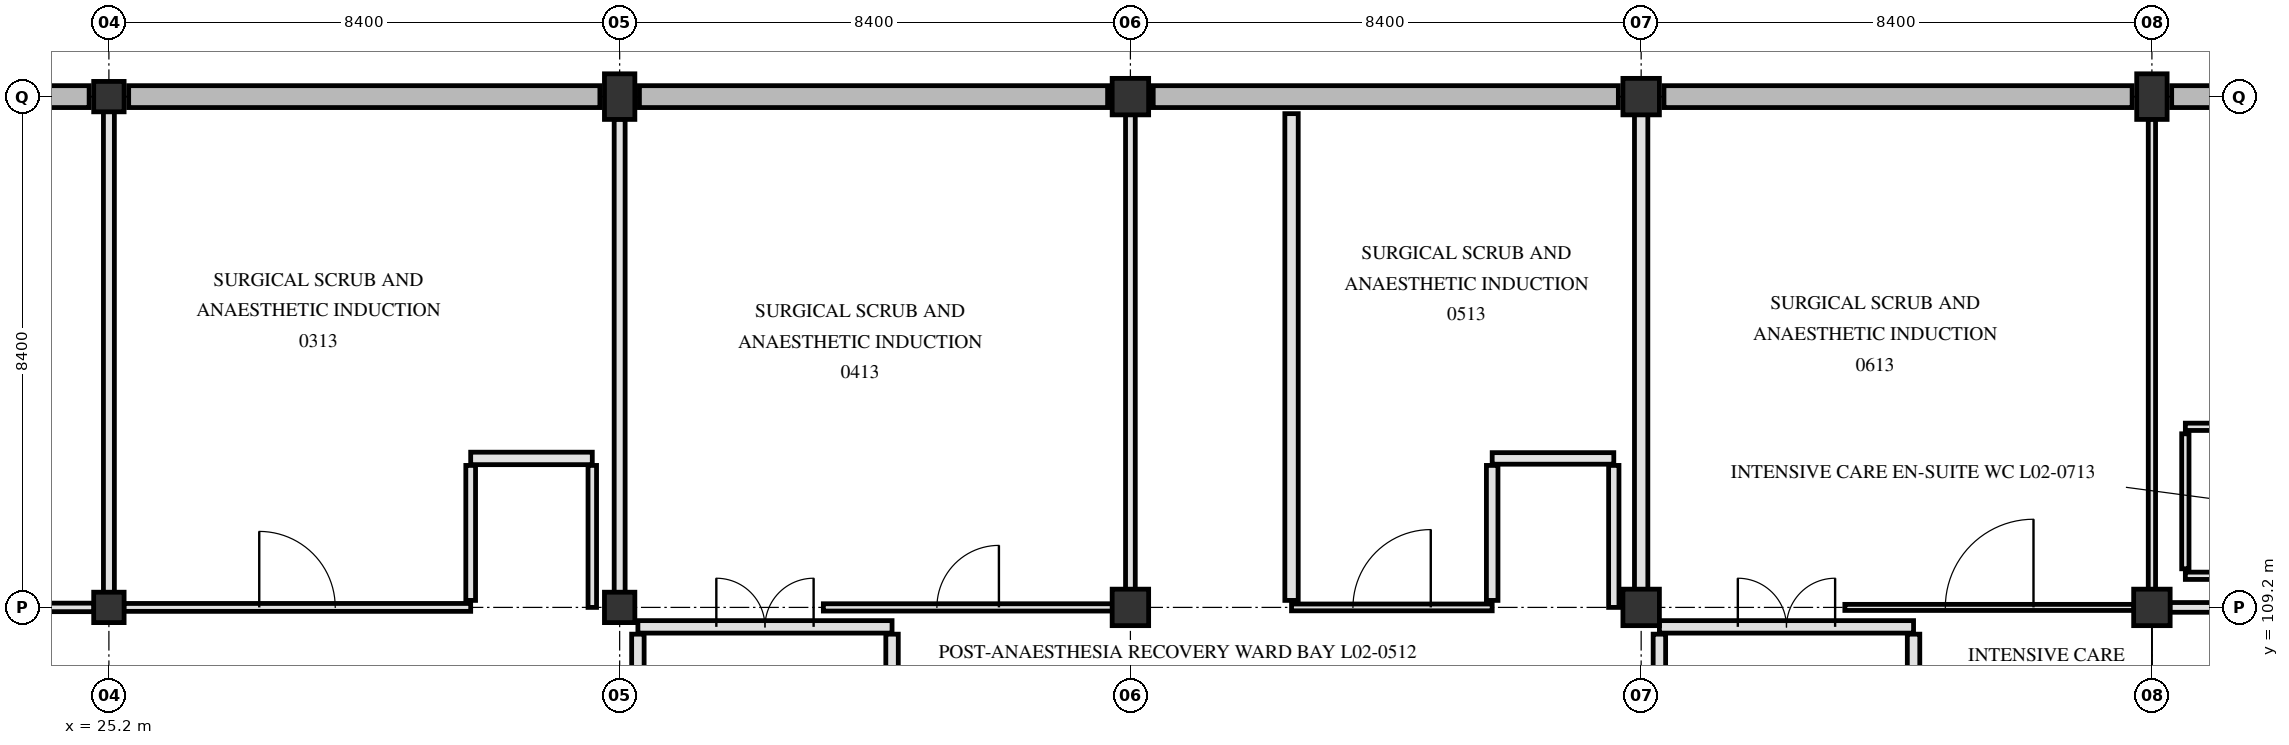
"""IFC4 building model, lengths in metres.
Left out: names, types, materials, properties, quantities, classifications, styles, units other than length and angle.
Written with IfcOpenShell. Run it as: python <this file> out.ifc"""

import sys

from ifc_helpers import new_model, si_unit, direction, frame, frame_2d, origin, origin_2d, place, context, subcontext, project, spatial, rectangle, extrude, element, fill, save


model = new_model("IFC4")
c1 = context("Model", 3, precision=1e-05, world=origin(), true_north=direction((0.0, 1.0)))
c2 = subcontext(c1, "Body", "Model", "MODEL_VIEW")
j1 = project(units=[si_unit("LENGTHUNIT", "METRE"), si_unit("PLANEANGLEUNIT", "RADIAN")], contexts=[c1])
p1 = place(None, origin())
s1 = spatial("IfcSite", under=j1, at=p1, CompositionType="ELEMENT")
p2 = place(p1, origin())
s2 = spatial("IfcBuilding", under=s1, at=p2, CompositionType="ELEMENT")
p3 = place(p2, frame((0.0, 0.0, 9.3)))
s3 = spatial("IfcBuildingStorey", under=s2, at=p3, CompositionType="ELEMENT", Elevation=9.3)
for number, where, z_axis, x_axis in (
    (1, (25.2, 109.2, 0.0), (0.0, 0.0, 1.0), (1.0, 0.0, 0.0)),
    (2, (25.2, 117.6, 0.0), (0.0, 0.0, 1.0), (1.0, 0.0, 0.0)),
    (3, (33.6, 109.2, 0.0), (0.0, 0.0, 1.0), (1.0, 0.0, 0.0)),
):
    element("IfcColumn", number, at=place(p3, frame(where, z_axis=z_axis, x_axis=x_axis)), inside=s3, PredefinedType="COLUMN", context=c2, shape_type="SweptSolid", body=[
        extrude(rectangle(XDim=0.5, YDim=0.5, at=origin_2d()), origin(), (0.0, 0.0, 1.0), 5.1),
    ])
p4 = place(p3, frame((33.6, 117.6, 0.0), z_axis=(0.0, 0.0, 1.0), x_axis=(1.0, 0.0, 0.0)))
e4 = element("IfcColumn", 4, at=p4, inside=s3, PredefinedType="PILASTER", context=c2, shape_type="SweptSolid", body=[
    extrude(rectangle(XDim=0.5, YDim=0.75, at=origin_2d()), origin(), (0.0, 0.0, 1.0), 5.1),
])
for number, where, z_axis, x_axis in (
    (5, (42.0, 109.2, 0.0), (0.0, 0.0, 1.0), (1.0, 0.0, 0.0)),
    (6, (42.0, 117.6, 0.0), (0.0, 0.0, 1.0), (1.0, 0.0, 0.0)),
    (7, (50.4, 109.2, 0.0), (0.0, 0.0, 1.0), (1.0, 0.0, 0.0)),
    (8, (50.4, 117.6, 0.0), (0.0, 0.0, 1.0), (1.0, 0.0, 0.0)),
    (9, (58.8, 109.2, 0.0), (0.0, 0.0, 1.0), (1.0, 0.0, 0.0)),
):
    element("IfcColumn", number, at=place(p3, frame(where, z_axis=z_axis, x_axis=x_axis)), inside=s3, PredefinedType="COLUMN", context=c2, shape_type="SweptSolid", body=[
        extrude(rectangle(XDim=0.6, YDim=0.6, at=origin_2d()), origin(), (0.0, 0.0, 1.0), 5.1),
    ])
p5 = place(p3, frame((58.8, 117.6, 0.0), z_axis=(0.0, 0.0, 1.0), x_axis=(1.0, 0.0, 0.0)))
e10 = element("IfcColumn", 10, at=p5, inside=s3, PredefinedType="PILASTER", context=c2, shape_type="SweptSolid", body=[
    extrude(rectangle(XDim=0.5, YDim=0.75, at=origin_2d()), origin(), (0.0, 0.0, 1.0), 5.1),
])
for number, where, z_axis, x_axis in (
    (11, (17.125, 117.6, 0.0), (0.0, 0.0, 1.0), (1.0, 0.0, 0.0)),
    (12, (25.525, 117.6, 0.0), (0.0, 0.0, 1.0), (1.0, 0.0, 0.0)),
):
    element("IfcWall", number, at=place(p3, frame(where, z_axis=z_axis, x_axis=x_axis)), inside=s3, PredefinedType="SOLIDWALL", context=c2, shape_type="SweptSolid", body=[
        extrude(rectangle(XDim=7.75, YDim=0.36, at=frame_2d((3.875, 0.0))), origin(), (0.0, 0.0, 1.0), 4.78),
    ])
p6 = place(p3, frame((33.925, 117.6, 0.0), z_axis=(0.0, 0.0, 1.0), x_axis=(1.0, 0.0, 0.0)))
e13 = element("IfcWall", 13, at=p6, inside=s3, PredefinedType="SOLIDWALL", context=c2, shape_type="SweptSolid", body=[
    extrude(rectangle(XDim=7.7, YDim=0.36, at=frame_2d((3.85, 0.0))), origin(), (0.0, 0.0, 1.0), 4.78),
])
p7 = place(p3, frame((42.375, 117.6, 0.0), z_axis=(0.0, 0.0, 1.0), x_axis=(1.0, 0.0, 0.0)))
e14 = element("IfcWall", 14, at=p7, inside=s3, PredefinedType="SOLIDWALL", context=c2, shape_type="SweptSolid", body=[
    extrude(rectangle(XDim=7.65, YDim=0.36, at=frame_2d((3.825, 0.0))), origin(), (0.0, 0.0, 1.0), 4.78),
])
p8 = place(p3, frame((50.775, 117.6, 0.0), z_axis=(0.0, 0.0, 1.0), x_axis=(1.0, 0.0, 0.0)))
e15 = element("IfcWall", 15, at=p8, inside=s3, PredefinedType="SOLIDWALL", context=c2, shape_type="SweptSolid", body=[
    extrude(rectangle(XDim=7.7, YDim=0.36, at=frame_2d((3.85, 0.0))), origin(), (0.0, 0.0, 1.0), 4.78),
])
p9 = place(p3, frame((59.125, 117.6, 0.0), z_axis=(0.0, 0.0, 1.0), x_axis=(1.0, 0.0, 0.0)))
e16 = element("IfcWall", 16, at=p9, inside=s3, PredefinedType="SOLIDWALL", context=c2, shape_type="SweptSolid", body=[
    extrude(rectangle(XDim=7.65, YDim=0.36, at=frame_2d((3.825, 0.0))), origin(), (0.0, 0.0, 1.0), 4.78),
])
p10 = place(p3, frame((38.08, 104.64, 0.0), z_axis=(0.0, 0.0, 1.0), x_axis=(0.0, 1.0, 0.0)))
e17 = element("IfcWall", 17, at=p10, inside=s3, PredefinedType="PARTITIONING", context=c2, shape_type="SweptSolid", body=[
    extrude(rectangle(XDim=4.12, YDim=0.205, at=frame_2d((2.06, 0.0))), origin(), (0.0, 0.0, 1.0), 4.77),
])
p11 = place(p3, frame((33.9, 104.64, 0.0), z_axis=(0.0, 0.0, 1.0), x_axis=(0.0, 1.0, 0.0)))
e18 = element("IfcWall", 18, at=p11, inside=s3, PredefinedType="PARTITIONING", context=c2, shape_type="SweptSolid", body=[
    extrude(rectangle(XDim=4.12, YDim=0.205, at=frame_2d((2.06, 0.0))), origin(), (0.0, 0.0, 1.0), 4.17),
])
p12 = place(p3, frame((33.9, 108.88, 0.0), z_axis=(0.0, 0.0, 1.0), x_axis=(1.0, 0.0, 0.0)))
e19 = element("IfcWall", 19, at=p12, inside=s3, PredefinedType="PARTITIONING", context=c2, shape_type="SweptSolid", body=[
    extrude(rectangle(XDim=4.18, YDim=0.205, at=frame_2d((2.09, 0.0))), origin(), (0.0, 0.0, 1.0), 4.02),
])
p13 = place(p12, frame((1.29, 0.0, 0.0)))
e20 = element("IfcOpeningElement", 20, at=p13, cuts=e19, PredefinedType="OPENING", context=c2, shape_type="SweptSolid", body=[
    extrude(rectangle(XDim=1.6, YDim=2.25, at=frame_2d((0.8, 1.125))), frame((0.0, 0.113, 0.0), z_axis=(0.0, -1.0, 0.0), x_axis=(1.0, 0.0, 0.0)), (0.0, 0.0, 1.0), 0.225),
])
p14 = place(p3, frame((54.88, 104.64, 0.0), z_axis=(0.0, 0.0, 1.0), x_axis=(0.0, 1.0, 0.0)))
e21 = element("IfcWall", 21, at=p14, inside=s3, PredefinedType="PARTITIONING", context=c2, shape_type="SweptSolid", body=[
    extrude(rectangle(XDim=4.12, YDim=0.205, at=frame_2d((2.06, 0.0))), origin(), (0.0, 0.0, 1.0), 4.77),
])
p15 = place(p3, frame((50.7, 104.64, 0.0), z_axis=(0.0, 0.0, 1.0), x_axis=(0.0, 1.0, 0.0)))
e22 = element("IfcWall", 22, at=p15, inside=s3, PredefinedType="PARTITIONING", context=c2, shape_type="SweptSolid", body=[
    extrude(rectangle(XDim=4.12, YDim=0.205, at=frame_2d((2.06, 0.0))), origin(), (0.0, 0.0, 1.0), 4.17),
])
p16 = place(p3, frame((50.7, 108.88, 0.0), z_axis=(0.0, 0.0, 1.0), x_axis=(1.0, 0.0, 0.0)))
e23 = element("IfcWall", 23, at=p16, inside=s3, PredefinedType="PARTITIONING", context=c2, shape_type="SweptSolid", body=[
    extrude(rectangle(XDim=4.18, YDim=0.205, at=frame_2d((2.09, 0.0))), origin(), (0.0, 0.0, 1.0), 4.02),
])
p17 = place(p16, frame((1.29, 0.0, 0.0)))
e24 = element("IfcOpeningElement", 24, at=p17, cuts=e23, PredefinedType="OPENING", context=c2, shape_type="SweptSolid", body=[
    extrude(rectangle(XDim=1.6, YDim=2.25, at=frame_2d((0.8, 1.125))), frame((0.0, 0.113, 0.0), z_axis=(0.0, -1.0, 0.0), x_axis=(1.0, 0.0, 0.0)), (0.0, 0.0, 1.0), 0.225),
])
p18 = place(p3, frame((17.045, 109.2, 0.0), z_axis=(0.0, 0.0, 1.0), x_axis=(1.0, 0.0, 0.0)))
e25 = element("IfcWall", 25, at=p18, inside=s3, PredefinedType="PARTITIONING", context=c2, shape_type="SweptSolid", body=[
    extrude(rectangle(XDim=7.91, YDim=0.14, at=frame_2d((3.955, 0.0))), origin(), (0.0, 0.0, 1.0), 4.02),
])
p19 = place(p18, frame((3.005, 0.0, 0.0)))
e26 = element("IfcOpeningElement", 26, at=p19, cuts=e25, PredefinedType="OPENING", context=c2, shape_type="SweptSolid", body=[
    extrude(rectangle(XDim=1.9, YDim=2.3, at=frame_2d((0.95, 1.15))), frame((0.0, 0.08, 0.0), z_axis=(0.0, -1.0, 0.0), x_axis=(1.0, 0.0, 0.0)), (0.0, 0.0, 1.0), 0.16),
])
p20 = place(p3, frame((25.445, 109.2, 0.0), z_axis=(0.0, 0.0, 1.0), x_axis=(1.0, 0.0, 0.0)))
e27 = element("IfcWall", 27, at=p20, inside=s3, PredefinedType="PARTITIONING", context=c2, shape_type="SweptSolid", body=[
    extrude(rectangle(XDim=5.705, YDim=0.13, at=frame_2d((2.853, 0.0))), origin(), (0.0, 0.0, 1.0), 4.02),
])
p21 = place(p20, frame((2.228, 0.0, 0.0)))
e28 = element("IfcOpeningElement", 28, at=p21, cuts=e27, PredefinedType="OPENING", context=c2, shape_type="SweptSolid", body=[
    extrude(rectangle(XDim=1.25, YDim=2.2, at=frame_2d((0.625, 1.1))), frame((0.0, 0.075, 0.0), z_axis=(0.0, -1.0, 0.0), x_axis=(1.0, 0.0, 0.0)), (0.0, 0.0, 1.0), 0.15),
])
p22 = place(p3, frame((36.95, 109.2, 0.0), z_axis=(0.0, 0.0, 1.0), x_axis=(1.0, 0.0, 0.0)))
e29 = element("IfcWall", 29, at=p22, inside=s3, PredefinedType="PARTITIONING", context=c2, shape_type="SweptSolid", body=[
    extrude(rectangle(XDim=4.755, YDim=0.12, at=frame_2d((2.377, 0.0))), origin(), (0.0, 0.0, 1.0), 4.02),
])
p23 = place(p22, frame((1.867, 0.0, 0.0)))
e30 = element("IfcOpeningElement", 30, at=p23, cuts=e29, PredefinedType="OPENING", context=c2, shape_type="SweptSolid", body=[
    extrude(rectangle(XDim=1.02, YDim=2.12, at=frame_2d((0.51, 1.06))), frame((0.0, 0.07, 0.0), z_axis=(0.0, -1.0, 0.0), x_axis=(1.0, 0.0, 0.0)), (0.0, 0.0, 1.0), 0.14),
])
p24 = place(p3, frame((44.65, 109.2, 0.0), z_axis=(0.0, 0.0, 1.0), x_axis=(1.0, 0.0, 0.0)))
e31 = element("IfcWall", 31, at=p24, inside=s3, PredefinedType="PARTITIONING", context=c2, shape_type="SweptSolid", body=[
    extrude(rectangle(XDim=3.3, YDim=0.112, at=frame_2d((1.65, 0.0))), origin(), (0.0, 0.0, 1.0), 4.02),
])
p25 = place(p24, frame((1.01, 0.0, 0.0)))
e32 = element("IfcOpeningElement", 32, at=p25, cuts=e31, PredefinedType="OPENING", context=c2, shape_type="SweptSolid", body=[
    extrude(rectangle(XDim=1.28, YDim=2.18, at=frame_2d((0.64, 1.09))), frame((0.0, 0.066, 0.0), z_axis=(0.0, -1.0, 0.0), x_axis=(1.0, 0.0, 0.0)), (0.0, 0.0, 1.0), 0.132),
])
p26 = place(p3, frame((53.75, 109.2, 0.0), z_axis=(0.0, 0.0, 1.0), x_axis=(1.0, 0.0, 0.0)))
e33 = element("IfcWall", 33, at=p26, inside=s3, PredefinedType="PARTITIONING", context=c2, shape_type="SweptSolid", body=[
    extrude(rectangle(XDim=4.755, YDim=0.1, at=frame_2d((2.377, 0.0))), origin(), (0.0, 0.0, 1.0), 4.02),
])
p27 = place(p26, frame((1.653, 0.0, 0.0)))
e34 = element("IfcOpeningElement", 34, at=p27, cuts=e33, PredefinedType="OPENING", context=c2, shape_type="SweptSolid", body=[
    extrude(rectangle(XDim=1.45, YDim=2.2, at=frame_2d((0.725, 1.1))), frame((0.0, 0.06, 0.0), z_axis=(0.0, -1.0, 0.0), x_axis=(1.0, 0.0, 0.0)), (0.0, 0.0, 1.0), 0.12),
])
p28 = place(p3, frame((59.095, 109.2, 0.0), z_axis=(0.0, 0.0, 1.0), x_axis=(1.0, 0.0, 0.0)))
e35 = element("IfcWall", 35, at=p28, inside=s3, PredefinedType="PARTITIONING", context=c2, shape_type="SweptSolid", body=[
    extrude(rectangle(XDim=7.76, YDim=0.16, at=frame_2d((3.88, 0.0))), origin(), (0.0, 0.0, 1.0), 4.17),
])
p29 = place(p28, frame((3.305, 0.0, 0.0)))
e36 = element("IfcOpeningElement", 36, at=p29, cuts=e35, PredefinedType="OPENING", context=c2, shape_type="SweptSolid", body=[
    extrude(rectangle(XDim=1.15, YDim=2.15, at=frame_2d((0.575, 1.075))), frame((0.0, 0.09, 0.0), z_axis=(0.0, -1.0, 0.0), x_axis=(1.0, 0.0, 0.0)), (0.0, 0.0, 1.0), 0.18),
])
p30 = place(p3, frame((59.35, 109.72, 0.0), z_axis=(0.0, 0.0, 1.0), x_axis=(1.0, 0.0, 0.0)))
e37 = element("IfcWall", 37, at=p30, inside=s3, PredefinedType="PARTITIONING", context=c2, shape_type="SweptSolid", body=[
    extrude(rectangle(XDim=2.9, YDim=0.12, at=frame_2d((1.45, 0.0))), origin(), (0.0, 0.0, 1.0), 4.77),
])
p31 = place(p3, frame((31.15, 111.65, 0.0), z_axis=(0.0, 0.0, 1.0), x_axis=(1.0, 0.0, 0.0)))
e38 = element("IfcWall", 38, at=p31, inside=s3, PredefinedType="PARTITIONING", context=c2, shape_type="SweptSolid", body=[
    extrude(rectangle(XDim=2.0, YDim=0.205, at=frame_2d((1.0, 0.0))), origin(), (0.0, 0.0, 1.0), 4.77),
])
p32 = place(p3, frame((47.95, 111.65, 0.0), z_axis=(0.0, 0.0, 1.0), x_axis=(1.0, 0.0, 0.0)))
e39 = element("IfcWall", 39, at=p32, inside=s3, PredefinedType="PARTITIONING", context=c2, shape_type="SweptSolid", body=[
    extrude(rectangle(XDim=2.0, YDim=0.19, at=frame_2d((1.0, 0.0))), origin(), (0.0, 0.0, 1.0), 4.77),
])
p33 = place(p3, frame((59.35, 112.17, 0.0), z_axis=(0.0, 0.0, 1.0), x_axis=(1.0, 0.0, 0.0)))
e40 = element("IfcWall", 40, at=p33, inside=s3, PredefinedType="PARTITIONING", context=c2, shape_type="SweptSolid", body=[
    extrude(rectangle(XDim=2.9, YDim=0.12, at=frame_2d((1.45, 0.0))), origin(), (0.0, 0.0, 1.0), 4.77),
])
p34 = place(p33, frame((0.975, 0.0, 0.0)))
e41 = element("IfcOpeningElement", 41, at=p34, cuts=e40, PredefinedType="OPENING", context=c2, shape_type="SweptSolid", body=[
    extrude(rectangle(XDim=0.95, YDim=2.1, at=frame_2d((0.475, 1.05))), frame((0.0, 0.07, 0.0), z_axis=(0.0, -1.0, 0.0), x_axis=(1.0, 0.0, 0.0)), (0.0, 0.0, 1.0), 0.14),
])
p35 = place(p3, frame((25.2, 109.445, 0.0), z_axis=(0.0, 0.0, 1.0), x_axis=(0.0, 1.0, 0.0)))
e42 = element("IfcWall", 42, at=p35, inside=s3, PredefinedType="PARTITIONING", context=c2, shape_type="SweptSolid", body=[
    extrude(rectangle(XDim=7.91, YDim=0.18, at=frame_2d((3.955, 0.0))), origin(), (0.0, 0.0, 1.0), 4.17),
])
p36 = place(p3, frame((31.15, 109.315, 0.0), z_axis=(0.0, 0.0, 1.0), x_axis=(0.0, 1.0, 0.0)))
e43 = element("IfcWall", 43, at=p36, inside=s3, PredefinedType="PARTITIONING", context=c2, shape_type="SweptSolid", body=[
    extrude(rectangle(XDim=2.22, YDim=0.16, at=frame_2d((1.11, 0.0))), origin(), (0.0, 0.0, 1.0), 4.02),
])
p37 = place(p3, frame((33.15, 109.2, 0.0), z_axis=(0.0, 0.0, 1.0), x_axis=(0.0, 1.0, 0.0)))
e44 = element("IfcWall", 44, at=p37, inside=s3, PredefinedType="PARTITIONING", context=c2, shape_type="SweptSolid", body=[
    extrude(rectangle(XDim=2.335, YDim=0.14, at=frame_2d((1.167, 0.0))), origin(), (0.0, 0.0, 1.0), 4.02),
])
p38 = place(p3, frame((33.6, 109.445, 0.0), z_axis=(0.0, 0.0, 1.0), x_axis=(0.0, 1.0, 0.0)))
e45 = element("IfcWall", 45, at=p38, inside=s3, PredefinedType="PARTITIONING", context=c2, shape_type="SweptSolid", body=[
    extrude(rectangle(XDim=7.785, YDim=0.18, at=frame_2d((3.893, 0.0))), origin(), (0.0, 0.0, 1.0), 4.17),
])
p39 = place(p3, frame((42.0, 109.495, 0.0), z_axis=(0.0, 0.0, 1.0), x_axis=(0.0, 1.0, 0.0)))
e46 = element("IfcWall", 46, at=p39, inside=s3, PredefinedType="PARTITIONING", context=c2, shape_type="SweptSolid", body=[
    extrude(rectangle(XDim=7.81, YDim=0.16, at=frame_2d((3.905, 0.0))), origin(), (0.0, 0.0, 1.0), 4.17),
])
p40 = place(p3, frame((44.65, 109.315, 0.0), z_axis=(0.0, 0.0, 1.0), x_axis=(0.0, 1.0, 0.0)))
e47 = element("IfcWall", 47, at=p40, inside=s3, PredefinedType="PARTITIONING", context=c2, shape_type="SweptSolid", body=[
    extrude(rectangle(XDim=8.005, YDim=0.22, at=frame_2d((4.002, 0.0))), origin(), (0.0, 0.0, 1.0), 4.02),
])
p41 = place(p3, frame((47.95, 109.315, 0.0), z_axis=(0.0, 0.0, 1.0), x_axis=(0.0, 1.0, 0.0)))
e48 = element("IfcWall", 48, at=p41, inside=s3, PredefinedType="PARTITIONING", context=c2, shape_type="SweptSolid", body=[
    extrude(rectangle(XDim=2.22, YDim=0.19, at=frame_2d((1.11, 0.0))), origin(), (0.0, 0.0, 1.0), 4.02),
])
p42 = place(p3, frame((49.95, 109.2, 0.0), z_axis=(0.0, 0.0, 1.0), x_axis=(0.0, 1.0, 0.0)))
e49 = element("IfcWall", 49, at=p42, inside=s3, PredefinedType="PARTITIONING", context=c2, shape_type="SweptSolid", body=[
    extrude(rectangle(XDim=2.335, YDim=0.17, at=frame_2d((1.167, 0.0))), origin(), (0.0, 0.0, 1.0), 4.02),
])
p43 = place(p3, frame((50.4, 109.495, 0.0), z_axis=(0.0, 0.0, 1.0), x_axis=(0.0, 1.0, 0.0)))
e50 = element("IfcWall", 50, at=p43, inside=s3, PredefinedType="PARTITIONING", context=c2, shape_type="SweptSolid", body=[
    extrude(rectangle(XDim=7.81, YDim=0.22, at=frame_2d((3.905, 0.0))), origin(), (0.0, 0.0, 1.0), 4.17),
])
p44 = place(p3, frame((58.8, 109.495, 0.0), z_axis=(0.0, 0.0, 1.0), x_axis=(0.0, 1.0, 0.0)))
e51 = element("IfcWall", 51, at=p44, inside=s3, PredefinedType="PARTITIONING", context=c2, shape_type="SweptSolid", body=[
    extrude(rectangle(XDim=7.735, YDim=0.12, at=frame_2d((3.867, 0.0))), origin(), (0.0, 0.0, 1.0), 4.17),
])
p45 = place(p3, frame((59.35, 109.835, 0.0), z_axis=(0.0, 0.0, 1.0), x_axis=(0.0, 1.0, 0.0)))
e52 = element("IfcWall", 52, at=p45, inside=s3, PredefinedType="PARTITIONING", context=c2, shape_type="SweptSolid", body=[
    extrude(rectangle(XDim=2.22, YDim=0.12, at=frame_2d((1.11, 0.0))), origin(), (0.0, 0.0, 1.0), 4.77),
])
p46 = place(p13, origin())
e53 = element("IfcDoor", 53, at=p46, inside=s3, OperationType="DOUBLE_SWING_LEFT", PredefinedType="DOOR", context=c2, shape_type="SweptSolid", body=[
    extrude(rectangle(XDim=1.6, YDim=2.25, at=frame_2d((0.8, 1.125))), frame((0.0, 0.025, 0.0), z_axis=(0.0, -1.0, 0.0), x_axis=(1.0, 0.0, 0.0)), (0.0, 0.0, 1.0), 0.05),
])
fill(e20, e53)
p47 = place(p17, origin())
e54 = element("IfcDoor", 54, at=p47, inside=s3, OperationType="DOUBLE_SWING_LEFT", PredefinedType="DOOR", context=c2, shape_type="SweptSolid", body=[
    extrude(rectangle(XDim=1.6, YDim=2.25, at=frame_2d((0.8, 1.125))), frame((0.0, 0.025, 0.0), z_axis=(0.0, -1.0, 0.0), x_axis=(1.0, 0.0, 0.0)), (0.0, 0.0, 1.0), 0.05),
])
fill(e24, e54)
p48 = place(p21, origin())
e55 = element("IfcDoor", 55, at=p48, inside=s3, OperationType="SINGLE_SWING_LEFT", PredefinedType="DOOR", context=c2, shape_type="SweptSolid", body=[
    extrude(rectangle(XDim=1.25, YDim=2.2, at=frame_2d((0.625, 1.1))), frame((0.0, 0.025, 0.0), z_axis=(0.0, -1.0, 0.0), x_axis=(1.0, 0.0, 0.0)), (0.0, 0.0, 1.0), 0.05),
])
fill(e28, e55)
p49 = place(p23, origin())
e56 = element("IfcDoor", 56, at=p49, inside=s3, OperationType="SINGLE_SWING_RIGHT", PredefinedType="DOOR", context=c2, shape_type="SweptSolid", body=[
    extrude(rectangle(XDim=1.02, YDim=2.12, at=frame_2d((0.51, 1.06))), frame((0.0, 0.025, 0.0), z_axis=(0.0, -1.0, 0.0), x_axis=(1.0, 0.0, 0.0)), (0.0, 0.0, 1.0), 0.05),
])
fill(e30, e56)
p50 = place(p25, origin())
e57 = element("IfcDoor", 57, at=p50, inside=s3, OperationType="SINGLE_SWING_RIGHT", PredefinedType="DOOR", context=c2, shape_type="SweptSolid", body=[
    extrude(rectangle(XDim=1.28, YDim=2.18, at=frame_2d((0.64, 1.09))), frame((0.0, 0.025, 0.0), z_axis=(0.0, -1.0, 0.0), x_axis=(1.0, 0.0, 0.0)), (0.0, 0.0, 1.0), 0.05),
])
fill(e32, e57)
p51 = place(p27, origin())
e58 = element("IfcDoor", 58, at=p51, inside=s3, OperationType="SINGLE_SWING_RIGHT", PredefinedType="DOOR", context=c2, shape_type="SweptSolid", body=[
    extrude(rectangle(XDim=1.45, YDim=2.2, at=frame_2d((0.725, 1.1))), frame((0.0, 0.025, 0.0), z_axis=(0.0, -1.0, 0.0), x_axis=(1.0, 0.0, 0.0)), (0.0, 0.0, 1.0), 0.05),
])
fill(e34, e58)
save(model, sys.argv[1])
